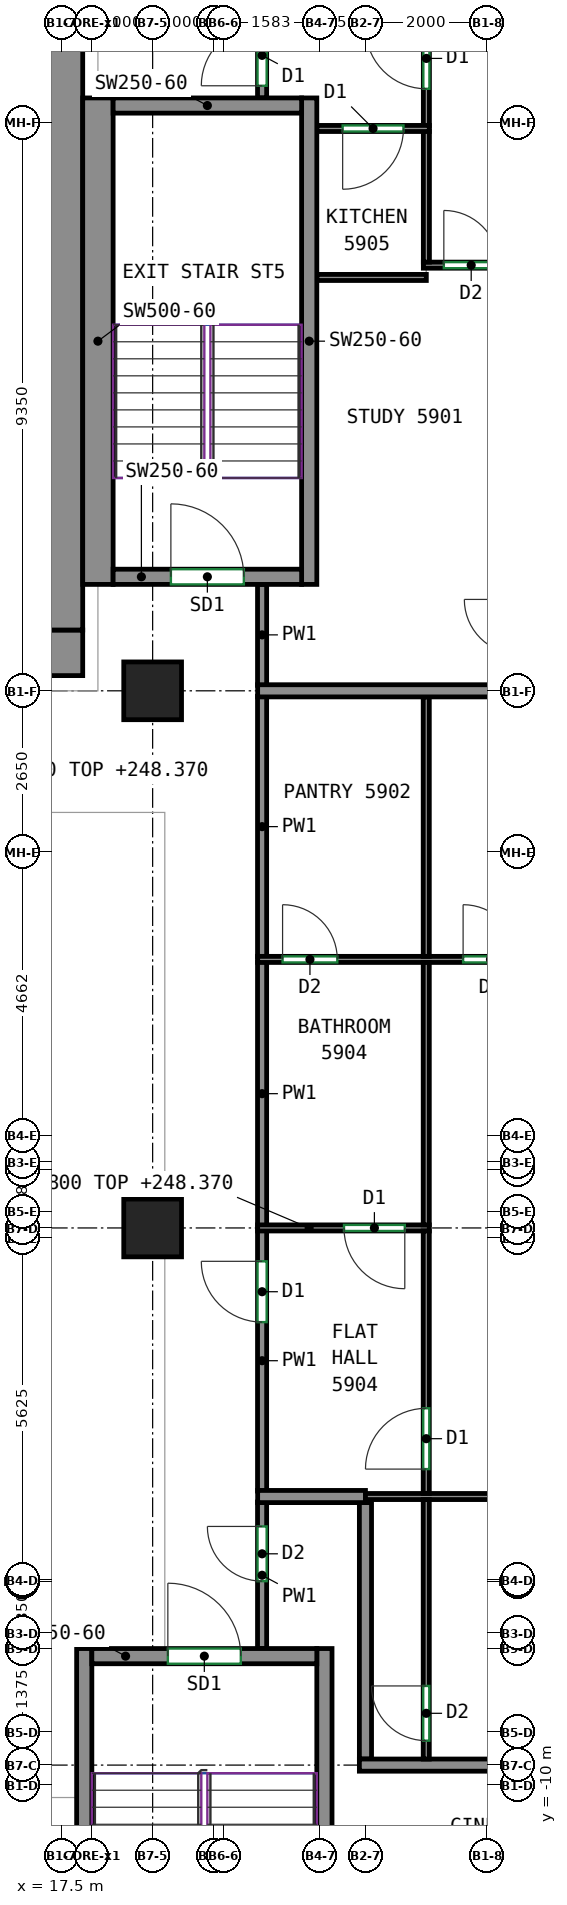
"""IFC4 building model, lengths in metres.
Left out: names, types, materials, properties, quantities, classifications, styles, units other than length and angle.
Written with IfcOpenShell. Run it as: python <this file> out.ifc"""

import sys

from ifc_helpers import new_model, si_unit, direction, frame, frame_2d, origin, origin_2d, place, context, subcontext, project, spatial, rectangle, extrude, source, transform, mapped, element, fill, save


model = new_model("IFC4")
c1 = context("Model", 3, precision=1e-05, world=origin(), true_north=direction((0.0, 1.0)))
c2 = subcontext(c1, "Body", "Model", "MODEL_VIEW")
j1 = project(units=[si_unit("LENGTHUNIT", "METRE"), si_unit("PLANEANGLEUNIT", "RADIAN")], contexts=[c1])
p1 = place(None, origin())
s1 = spatial("IfcSite", under=j1, at=p1, CompositionType="ELEMENT")
p2 = place(p1, origin())
s2 = spatial("IfcBuilding", under=s1, at=p2, CompositionType="ELEMENT")
p3 = place(p2, frame((0.0, 0.0, 245.8)))
s3 = spatial("IfcBuildingStorey", under=s2, at=p3, CompositionType="ELEMENT", Elevation=245.8)
m1 = source(origin(), c2, "Body", "SweptSolid", [
    extrude(rectangle(XDim=0.95, YDim=0.95, at=origin_2d()), origin(), (0.0, 0.0, 1.0), 3.12),
])
for number, where, z_axis, x_axis in (
    (1, (19.0, -0.833, 0.0), (0.0, 0.0, 1.0), (1.0, 0.0, 0.0)),
    (2, (19.0, 8.0, 0.0), (0.0, 0.0, 1.0), (1.0, 0.0, 0.0)),
):
    element("IfcColumn", number, at=place(p3, frame(where, z_axis=z_axis, x_axis=x_axis)), inside=s3, PredefinedType="COLUMN", context=c2, shape_type="MappedRepresentation", body=[
        mapped(m1, transform((0.0, 0.0, 0.0))),
    ])
m2 = source(origin(), c2, "Body", "SweptSolid", [
    extrude(rectangle(XDim=5.38, YDim=0.75, at=frame_2d((2.69, 0.0))), origin(), (0.0, 0.0, 1.0), 3.12),
])
p4 = place(p3, frame((12.47, 8.625, 0.0), z_axis=(0.0, 0.0, 1.0), x_axis=(1.0, 0.0, 0.0)))
e3 = element("IfcWall", 3, at=p4, inside=s3, PredefinedType="SHEAR", context=c2, shape_type="MappedRepresentation", body=[
    mapped(m2, transform((0.0, 0.0, 0.0))),
])
p5 = place(p4, frame((2.18, 0.0, 0.0)))
e4 = element("IfcOpeningElement", 4, at=p5, cuts=e3, PredefinedType="OPENING", context=c2, shape_type="SweptSolid", body=[
    extrude(rectangle(XDim=1.2, YDim=2.1, at=frame_2d((0.6, 1.05))), frame((0.0, 0.385, 0.0), z_axis=(0.0, -1.0, 0.0), x_axis=(1.0, 0.0, 0.0)), (0.0, 0.0, 1.0), 0.77),
])
m3 = source(origin(), c2, "Body", "SweptSolid", [
    extrude(rectangle(XDim=12.0, YDim=0.75, at=frame_2d((6.0, 0.0))), origin(), (0.0, 0.0, 1.0), 3.12),
])
p6 = place(p3, frame((17.475, 9.0, 0.0), z_axis=(0.0, 0.0, 1.0), x_axis=(0.0, 1.0, 0.0)))
e5 = element("IfcWall", 5, at=p6, inside=s3, PredefinedType="SHEAR", context=c2, shape_type="MappedRepresentation", body=[
    mapped(m3, transform((0.0, 0.0, 0.0))),
])
m4 = source(origin(), c2, "Body", "SweptSolid", [
    extrude(rectangle(XDim=8.0, YDim=0.25, at=frame_2d((4.0, 0.0))), origin(), (0.0, 0.0, 1.0), 3.12),
])
for number, where, z_axis, x_axis in (
    (6, (17.875, -15.75, 0.0), (0.0, 0.0, 1.0), (0.0, 1.0, 0.0)),
    (7, (21.825, -15.75, 0.0), (0.0, 0.0, 1.0), (0.0, 1.0, 0.0)),
):
    element("IfcWall", number, at=place(p3, frame(where, z_axis=z_axis, x_axis=x_axis)), inside=s3, PredefinedType="SHEAR", context=c2, shape_type="MappedRepresentation", body=[
        mapped(m4, transform((0.0, 0.0, 0.0))),
    ])
m5 = source(origin(), c2, "Body", "SweptSolid", [
    extrude(rectangle(XDim=3.7, YDim=0.25, at=frame_2d((1.85, 0.0))), origin(), (0.0, 0.0, 1.0), 3.12),
])
p7 = place(p3, frame((18.0, -7.875, 0.0), z_axis=(0.0, 0.0, 1.0), x_axis=(1.0, 0.0, 0.0)))
e8 = element("IfcWall", 8, at=p7, inside=s3, PredefinedType="SHEAR", context=c2, shape_type="MappedRepresentation", body=[
    mapped(m5, transform((0.0, 0.0, 0.0))),
])
p8 = place(p7, frame((1.25, 0.0, 0.0)))
e9 = element("IfcOpeningElement", 9, at=p8, cuts=e8, PredefinedType="OPENING", context=c2, shape_type="SweptSolid", body=[
    extrude(rectangle(XDim=1.2, YDim=2.1, at=frame_2d((0.6, 1.05))), frame((0.0, 0.135, 0.0), z_axis=(0.0, -1.0, 0.0), x_axis=(1.0, 0.0, 0.0)), (0.0, 0.0, 1.0), 0.27),
])
m6 = source(origin(), c2, "Body", "SweptSolid", [
    extrude(rectangle(XDim=8.0, YDim=0.5, at=frame_2d((4.0, 0.0))), origin(), (0.0, 0.0, 1.0), 3.12),
])
p9 = place(p3, frame((18.1, 9.75, 0.0), z_axis=(0.0, 0.0, 1.0), x_axis=(0.0, 1.0, 0.0)))
e10 = element("IfcWall", 10, at=p9, inside=s3, PredefinedType="SHEAR", context=c2, shape_type="MappedRepresentation", body=[
    mapped(m6, transform((0.0, 0.0, 0.0))),
])
p10 = place(p3, frame((21.575, 9.75, 0.0), z_axis=(0.0, 0.0, 1.0), x_axis=(0.0, 1.0, 0.0)))
e11 = element("IfcWall", 11, at=p10, inside=s3, PredefinedType="SHEAR", context=c2, shape_type="MappedRepresentation", body=[
    mapped(m4, transform((0.0, 0.0, 0.0))),
])
m7 = source(origin(), c2, "Body", "SweptSolid", [
    extrude(rectangle(XDim=3.1, YDim=0.25, at=frame_2d((1.55, 0.0))), origin(), (0.0, 0.0, 1.0), 3.12),
])
p11 = place(p3, frame((18.35, 9.875, 0.0), z_axis=(0.0, 0.0, 1.0), x_axis=(1.0, 0.0, 0.0)))
e12 = element("IfcWall", 12, at=p11, inside=s3, PredefinedType="SHEAR", context=c2, shape_type="MappedRepresentation", body=[
    mapped(m7, transform((0.0, 0.0, 0.0))),
])
p12 = place(p11, frame((0.95, 0.0, 0.0)))
e13 = element("IfcOpeningElement", 13, at=p12, cuts=e12, PredefinedType="OPENING", context=c2, shape_type="SweptSolid", body=[
    extrude(rectangle(XDim=1.2, YDim=2.1, at=frame_2d((0.6, 1.05))), frame((0.0, 0.135, 0.0), z_axis=(0.0, -1.0, 0.0), x_axis=(1.0, 0.0, 0.0)), (0.0, 0.0, 1.0), 0.27),
])
p13 = place(p3, frame((18.35, 17.625, 0.0), z_axis=(0.0, 0.0, 1.0), x_axis=(1.0, 0.0, 0.0)))
e14 = element("IfcWall", 14, at=p13, inside=s3, PredefinedType="SHEAR", context=c2, shape_type="MappedRepresentation", body=[
    mapped(m7, transform((0.0, 0.0, 0.0))),
])
p14 = place(p3, frame((20.8, -7.75, 0.0), z_axis=(0.0, 0.0, 1.0), x_axis=(0.0, 1.0, 0.0)))
e15 = element("IfcWall", 15, at=p14, inside=s3, PredefinedType="PARTITIONING", context=c2, shape_type="SweptSolid", body=[
    extrude(rectangle(XDim=2.41, YDim=0.15, at=frame_2d((1.205, 0.0))), origin(), (0.0, 0.0, 1.0), 3.12),
])
p15 = place(p14, frame((1.108, 0.0, 0.0)))
e16 = element("IfcOpeningElement", 16, at=p15, cuts=e15, PredefinedType="OPENING", context=c2, shape_type="SweptSolid", body=[
    extrude(rectangle(XDim=0.9, YDim=2.1, at=frame_2d((0.45, 1.05))), frame((0.0, 0.085, 0.0), z_axis=(0.0, -1.0, 0.0), x_axis=(1.0, 0.0, 0.0)), (0.0, 0.0, 1.0), 0.17),
])
p16 = place(p3, frame((20.8, -5.16, 0.0), z_axis=(0.0, 0.0, 1.0), x_axis=(0.0, 1.0, 0.0)))
e17 = element("IfcWall", 17, at=p16, inside=s3, PredefinedType="PARTITIONING", context=c2, shape_type="SweptSolid", body=[
    extrude(rectangle(XDim=4.287, YDim=0.15, at=frame_2d((2.144, 0.0))), origin(), (0.0, 0.0, 1.0), 3.12),
])
p17 = place(p16, frame((2.778, 0.0, 0.0)))
e18 = element("IfcOpeningElement", 18, at=p17, cuts=e17, PredefinedType="OPENING", context=c2, shape_type="SweptSolid", body=[
    extrude(rectangle(XDim=1.0, YDim=2.1, at=frame_2d((0.5, 1.05))), frame((0.0, 0.085, 0.0), z_axis=(0.0, -1.0, 0.0), x_axis=(1.0, 0.0, 0.0)), (0.0, 0.0, 1.0), 0.17),
])
p18 = place(p3, frame((20.8, -0.793, 0.0), z_axis=(0.0, 0.0, 1.0), x_axis=(0.0, 1.0, 0.0)))
e19 = element("IfcWall", 19, at=p18, inside=s3, PredefinedType="PARTITIONING", context=c2, shape_type="SweptSolid", body=[
    extrude(rectangle(XDim=4.336, YDim=0.15, at=frame_2d((2.168, 0.0))), origin(), (0.0, 0.0, 1.0), 3.12),
])
p19 = place(p3, frame((20.8, 3.623, 0.0), z_axis=(0.0, 0.0, 1.0), x_axis=(0.0, 1.0, 0.0)))
e20 = element("IfcWall", 20, at=p19, inside=s3, PredefinedType="PARTITIONING", context=c2, shape_type="SweptSolid", body=[
    extrude(rectangle(XDim=4.287, YDim=0.15, at=frame_2d((2.144, 0.0))), origin(), (0.0, 0.0, 1.0), 3.12),
])
p20 = place(p3, frame((20.8, 8.09, 0.0), z_axis=(0.0, 0.0, 1.0), x_axis=(0.0, 1.0, 0.0)))
e21 = element("IfcWall", 21, at=p20, inside=s3, PredefinedType="PARTITIONING", context=c2, shape_type="SweptSolid", body=[
    extrude(rectangle(XDim=1.66, YDim=0.15, at=frame_2d((0.83, 0.0))), origin(), (0.0, 0.0, 1.0), 3.12),
])
p21 = place(p3, frame((20.8, 17.75, 0.0), z_axis=(0.0, 0.0, 1.0), x_axis=(0.0, 1.0, 0.0)))
e22 = element("IfcWall", 22, at=p21, inside=s3, PredefinedType="PARTITIONING", context=c2, shape_type="SweptSolid", body=[
    extrude(rectangle(XDim=1.762, YDim=0.15, at=frame_2d((0.881, 0.0))), origin(), (0.0, 0.0, 1.0), 3.12),
])
p22 = place(p21, frame((0.2, 0.0, 0.0)))
e23 = element("IfcOpeningElement", 23, at=p22, cuts=e22, PredefinedType="OPENING", context=c2, shape_type="SweptSolid", body=[
    extrude(rectangle(XDim=1.0, YDim=2.1, at=frame_2d((0.5, 1.05))), frame((0.0, 0.085, 0.0), z_axis=(0.0, -1.0, 0.0), x_axis=(1.0, 0.0, 0.0)), (0.0, 0.0, 1.0), 0.17),
])
p23 = place(p3, frame((22.5, -9.567, 0.0), z_axis=(0.0, 0.0, 1.0), x_axis=(0.0, 1.0, 0.0)))
e24 = element("IfcWall", 24, at=p23, inside=s3, PredefinedType="PARTITIONING", context=c2, shape_type="SweptSolid", body=[
    extrude(rectangle(XDim=4.217, YDim=0.2, at=frame_2d((2.108, 0.0))), origin(), (0.0, 0.0, 1.0), 3.12),
])
p24 = place(p3, frame((22.4, -9.667, 0.0), z_axis=(0.0, 0.0, 1.0), x_axis=(1.0, 0.0, 0.0)))
e25 = element("IfcWall", 25, at=p24, inside=s3, PredefinedType="PARTITIONING", context=c2, shape_type="SweptSolid", body=[
    extrude(rectangle(XDim=6.3, YDim=0.2, at=frame_2d((3.15, 0.0))), origin(), (0.0, 0.0, 1.0), 3.12),
])
p25 = place(p3, frame((20.727, -5.25, 0.0), z_axis=(0.0, 0.0, 1.0), x_axis=(1.0, 0.0, 0.0)))
e26 = element("IfcWall", 26, at=p25, inside=s3, PredefinedType="PARTITIONING", context=c2, shape_type="SweptSolid", body=[
    extrude(rectangle(XDim=1.773, YDim=0.2, at=frame_2d((0.886, 0.0))), origin(), (0.0, 0.0, 1.0), 3.12),
])
p26 = place(p3, frame((22.5, -5.25, 0.0), z_axis=(0.0, 0.0, 1.0), x_axis=(1.0, 0.0, 0.0)))
e27 = element("IfcWall", 27, at=p26, inside=s3, PredefinedType="PARTITIONING", context=c2, shape_type="SweptSolid", body=[
    extrude(rectangle(XDim=6.75, YDim=0.1, at=frame_2d((3.375, 0.0))), origin(), (0.0, 0.0, 1.0), 3.12),
])
p27 = place(p26, frame((2.819, 0.0, 0.0)))
e28 = element("IfcOpeningElement", 28, at=p27, cuts=e27, PredefinedType="OPENING", context=c2, shape_type="SweptSolid", body=[
    extrude(rectangle(XDim=0.9, YDim=2.1, at=frame_2d((0.45, 1.05))), frame((0.0, 0.06, 0.0), z_axis=(0.0, -1.0, 0.0), x_axis=(1.0, 0.0, 0.0)), (0.0, 0.0, 1.0), 0.12),
])
p28 = place(p3, frame((23.5, -9.567, 0.0), z_axis=(0.0, 0.0, 1.0), x_axis=(0.0, 1.0, 0.0)))
e29 = element("IfcWall", 29, at=p28, inside=s3, PredefinedType="PARTITIONING", context=c2, shape_type="SweptSolid", body=[
    extrude(rectangle(XDim=4.267, YDim=0.1, at=frame_2d((2.133, 0.0))), origin(), (0.0, 0.0, 1.0), 3.12),
])
p29 = place(p28, frame((0.302, 0.0, 0.0)))
e30 = element("IfcOpeningElement", 30, at=p29, cuts=e29, PredefinedType="OPENING", context=c2, shape_type="SweptSolid", body=[
    extrude(rectangle(XDim=0.9, YDim=2.1, at=frame_2d((0.45, 1.05))), frame((0.0, 0.06, 0.0), z_axis=(0.0, -1.0, 0.0), x_axis=(1.0, 0.0, 0.0)), (0.0, 0.0, 1.0), 0.12),
])
p30 = place(p3, frame((23.55, -0.833, 0.0), z_axis=(0.0, 0.0, 1.0), x_axis=(-1.0, 0.0, 0.0)))
e31 = element("IfcWall", 31, at=p30, inside=s3, PredefinedType="PARTITIONING", context=c2, shape_type="SweptSolid", body=[
    extrude(rectangle(XDim=2.823, YDim=0.1, at=frame_2d((1.412, 0.0))), origin(), (0.0, 0.0, 1.0), 2.57),
])
p31 = place(p30, frame((0.403, 0.0, 0.0)))
e32 = element("IfcOpeningElement", 32, at=p31, cuts=e31, PredefinedType="OPENING", context=c2, shape_type="SweptSolid", body=[
    extrude(rectangle(XDim=1.0, YDim=2.1, at=frame_2d((0.5, 1.05))), frame((0.0, 0.06, 0.0), z_axis=(0.0, -1.0, 0.0), x_axis=(1.0, 0.0, 0.0)), (0.0, 0.0, 1.0), 0.12),
])
p32 = place(p3, frame((23.5, -5.2, 0.0), z_axis=(0.0, 0.0, 1.0), x_axis=(0.0, 1.0, 0.0)))
e33 = element("IfcWall", 33, at=p32, inside=s3, PredefinedType="PARTITIONING", context=c2, shape_type="SweptSolid", body=[
    extrude(rectangle(XDim=4.317, YDim=0.1, at=frame_2d((2.158, 0.0))), origin(), (0.0, 0.0, 1.0), 3.12),
])
p33 = place(p32, frame((0.401, 0.0, 0.0)))
e34 = element("IfcOpeningElement", 34, at=p33, cuts=e33, PredefinedType="OPENING", context=c2, shape_type="SweptSolid", body=[
    extrude(rectangle(XDim=1.0, YDim=2.1, at=frame_2d((0.5, 1.05))), frame((0.0, 0.06, 0.0), z_axis=(0.0, -1.0, 0.0), x_axis=(1.0, 0.0, 0.0)), (0.0, 0.0, 1.0), 0.12),
])
p34 = place(p3, frame((20.727, 3.583, 0.0), z_axis=(0.0, 0.0, 1.0), x_axis=(1.0, 0.0, 0.0)))
e35 = element("IfcWall", 35, at=p34, inside=s3, PredefinedType="PARTITIONING", context=c2, shape_type="SweptSolid", body=[
    extrude(rectangle(XDim=8.523, YDim=0.1, at=frame_2d((4.261, 0.0))), origin(), (0.0, 0.0, 1.0), 3.12),
])
p35 = place(p34, frame((0.41, 0.0, 0.0)))
e36 = element("IfcOpeningElement", 36, at=p35, cuts=e35, PredefinedType="OPENING", context=c2, shape_type="SweptSolid", body=[
    extrude(rectangle(XDim=0.9, YDim=2.1, at=frame_2d((0.45, 1.05))), frame((0.0, 0.06, 0.0), z_axis=(0.0, -1.0, 0.0), x_axis=(1.0, 0.0, 0.0)), (0.0, 0.0, 1.0), 0.12),
])
p36 = place(p34, frame((3.379, 0.0, 0.0)))
e37 = element("IfcOpeningElement", 37, at=p36, cuts=e35, PredefinedType="OPENING", context=c2, shape_type="SweptSolid", body=[
    extrude(rectangle(XDim=0.9, YDim=2.1, at=frame_2d((0.45, 1.05))), frame((0.0, 0.06, 0.0), z_axis=(0.0, -1.0, 0.0), x_axis=(1.0, 0.0, 0.0)), (0.0, 0.0, 1.0), 0.12),
])
p37 = place(p3, frame((23.5, -0.783, 0.0), z_axis=(0.0, 0.0, 1.0), x_axis=(0.0, 1.0, 0.0)))
e38 = element("IfcWall", 38, at=p37, inside=s3, PredefinedType="PARTITIONING", context=c2, shape_type="SweptSolid", body=[
    extrude(rectangle(XDim=4.316, YDim=0.1, at=frame_2d((2.158, 0.0))), origin(), (0.0, 0.0, 1.0), 3.12),
])
p38 = place(p3, frame((23.5, 3.633, 0.0), z_axis=(0.0, 0.0, 1.0), x_axis=(0.0, 1.0, 0.0)))
e39 = element("IfcWall", 39, at=p38, inside=s3, PredefinedType="PARTITIONING", context=c2, shape_type="SweptSolid", body=[
    extrude(rectangle(XDim=4.267, YDim=0.1, at=frame_2d((2.133, 0.0))), origin(), (0.0, 0.0, 1.0), 3.12),
])
p39 = place(p3, frame((20.727, 8.0, 0.0), z_axis=(0.0, 0.0, 1.0), x_axis=(1.0, 0.0, 0.0)))
e40 = element("IfcWall", 40, at=p39, inside=s3, PredefinedType="PARTITIONING", context=c2, shape_type="SweptSolid", body=[
    extrude(rectangle(XDim=7.973, YDim=0.2, at=frame_2d((3.986, 0.0))), origin(), (0.0, 0.0, 1.0), 2.57),
])
p40 = place(p3, frame((23.452, 15.0, 0.0), z_axis=(0.0, 0.0, 1.0), x_axis=(1.0, 0.0, 0.0)))
e41 = element("IfcWall", 41, at=p40, inside=s3, PredefinedType="PARTITIONING", context=c2, shape_type="SweptSolid", body=[
    extrude(rectangle(XDim=5.798, YDim=0.1, at=frame_2d((2.899, 0.0))), origin(), (0.0, 0.0, 1.0), 3.12),
])
p41 = place(p40, frame((0.337, 0.0, 0.0)))
e42 = element("IfcOpeningElement", 42, at=p41, cuts=e41, PredefinedType="OPENING", context=c2, shape_type="SweptSolid", body=[
    extrude(rectangle(XDim=0.9, YDim=2.1, at=frame_2d((0.45, 1.05))), frame((0.0, 0.06, 0.0), z_axis=(0.0, -1.0, 0.0), x_axis=(1.0, 0.0, 0.0)), (0.0, 0.0, 1.0), 0.12),
])
p42 = place(p3, frame((23.501, 14.798, 0.0), z_axis=(0.0, 0.0, 1.0), x_axis=(-1.0, 0.0, 0.0)))
e43 = element("IfcWall", 43, at=p42, inside=s3, PredefinedType="PARTITIONING", context=c2, shape_type="SweptSolid", body=[
    extrude(rectangle(XDim=1.801, YDim=0.1, at=frame_2d((0.9, 0.0))), origin(), (0.0, 0.0, 1.0), 3.12),
])
p43 = place(p3, frame((23.502, 15.05, 0.0), z_axis=(0.0, 0.0, 1.0), x_axis=(0.0, 1.0, 0.0)))
e44 = element("IfcWall", 44, at=p43, inside=s3, PredefinedType="PARTITIONING", context=c2, shape_type="SweptSolid", body=[
    extrude(rectangle(XDim=2.158, YDim=0.1, at=frame_2d((1.079, 0.0))), origin(), (0.0, 0.0, 1.0), 3.12),
])
p44 = place(p3, frame((23.502, 17.288, 0.0), z_axis=(0.0, 0.0, 1.0), x_axis=(0.0, 1.0, 0.0)))
e45 = element("IfcWall", 45, at=p44, inside=s3, PredefinedType="PARTITIONING", context=c2, shape_type="SweptSolid", body=[
    extrude(rectangle(XDim=2.224, YDim=0.1, at=frame_2d((1.112, 0.0))), origin(), (0.0, 0.0, 1.0), 3.12),
])
p45 = place(p44, frame((0.612, 0.0, 0.0)))
e46 = element("IfcOpeningElement", 46, at=p45, cuts=e45, PredefinedType="OPENING", context=c2, shape_type="SweptSolid", body=[
    extrude(rectangle(XDim=1.0, YDim=2.1, at=frame_2d((0.5, 1.05))), frame((0.0, 0.06, 0.0), z_axis=(0.0, -1.0, 0.0), x_axis=(1.0, 0.0, 0.0)), (0.0, 0.0, 1.0), 0.12),
])
p46 = place(p3, frame((23.55, 17.248, 0.0), z_axis=(0.0, 0.0, 1.0), x_axis=(-1.0, 0.0, 0.0)))
e47 = element("IfcWall", 47, at=p46, inside=s3, PredefinedType="PARTITIONING", context=c2, shape_type="SweptSolid", body=[
    extrude(rectangle(XDim=1.85, YDim=0.1, at=frame_2d((0.925, 0.0))), origin(), (0.0, 0.0, 1.0), 3.12),
])
p47 = place(p46, frame((0.425, 0.0, 0.0)))
e48 = element("IfcOpeningElement", 48, at=p47, cuts=e47, PredefinedType="OPENING", context=c2, shape_type="SweptSolid", body=[
    extrude(rectangle(XDim=1.0, YDim=2.1, at=frame_2d((0.5, 1.05))), frame((0.0, 0.06, 0.0), z_axis=(0.0, -1.0, 0.0), x_axis=(1.0, 0.0, 0.0)), (0.0, 0.0, 1.0), 0.12),
])
p48 = place(p8, origin())
e49 = element("IfcDoor", 49, at=p48, inside=s3, OperationType="DOUBLE_DOOR_SINGLE_SWING", PredefinedType="DOOR", context=c2, shape_type="SweptSolid", body=[
    extrude(rectangle(XDim=1.2, YDim=2.1, at=frame_2d((0.6, 1.05))), frame((0.0, 0.025, 0.0), z_axis=(0.0, -1.0, 0.0), x_axis=(1.0, 0.0, 0.0)), (0.0, 0.0, 1.0), 0.05),
])
fill(e9, e49)
p49 = place(p12, origin())
e50 = element("IfcDoor", 50, at=p49, inside=s3, OperationType="DOUBLE_DOOR_SINGLE_SWING", PredefinedType="DOOR", context=c2, shape_type="SweptSolid", body=[
    extrude(rectangle(XDim=1.2, YDim=2.1, at=frame_2d((0.6, 1.05))), frame((0.0, 0.025, 0.0), z_axis=(0.0, -1.0, 0.0), x_axis=(1.0, 0.0, 0.0)), (0.0, 0.0, 1.0), 0.05),
])
fill(e13, e50)
p50 = place(p29, origin())
e51 = element("IfcDoor", 51, at=p50, inside=s3, OperationType="SINGLE_SWING_RIGHT", PredefinedType="DOOR", context=c2, shape_type="SweptSolid", body=[
    extrude(rectangle(XDim=0.9, YDim=2.1, at=frame_2d((0.45, 1.05))), frame((0.0, 0.025, 0.0), z_axis=(0.0, -1.0, 0.0), x_axis=(1.0, 0.0, 0.0)), (0.0, 0.0, 1.0), 0.05),
])
fill(e30, e51)
p51 = place(p15, origin())
e52 = element("IfcDoor", 52, at=p51, inside=s3, OperationType="SINGLE_SWING_RIGHT", PredefinedType="DOOR", context=c2, shape_type="SweptSolid", body=[
    extrude(rectangle(XDim=0.9, YDim=2.1, at=frame_2d((0.45, 1.05))), frame((0.0, 0.025, 0.0), z_axis=(0.0, -1.0, 0.0), x_axis=(1.0, 0.0, 0.0)), (0.0, 0.0, 1.0), 0.05),
])
fill(e16, e52)
p52 = place(p33, origin())
e53 = element("IfcDoor", 53, at=p52, inside=s3, OperationType="SINGLE_SWING_LEFT", PredefinedType="DOOR", context=c2, shape_type="SweptSolid", body=[
    extrude(rectangle(XDim=1.0, YDim=2.1, at=frame_2d((0.5, 1.05))), frame((0.0, 0.025, 0.0), z_axis=(0.0, -1.0, 0.0), x_axis=(1.0, 0.0, 0.0)), (0.0, 0.0, 1.0), 0.05),
])
fill(e34, e53)
p53 = place(p17, origin())
e54 = element("IfcDoor", 54, at=p53, inside=s3, OperationType="SINGLE_SWING_RIGHT", PredefinedType="DOOR", context=c2, shape_type="SweptSolid", body=[
    extrude(rectangle(XDim=1.0, YDim=2.1, at=frame_2d((0.5, 1.05))), frame((0.0, 0.025, 0.0), z_axis=(0.0, -1.0, 0.0), x_axis=(1.0, 0.0, 0.0)), (0.0, 0.0, 1.0), 0.05),
])
fill(e18, e54)
p54 = place(p31, origin())
e55 = element("IfcDoor", 55, at=p54, inside=s3, OperationType="SINGLE_SWING_LEFT", PredefinedType="DOOR", context=c2, shape_type="SweptSolid", body=[
    extrude(rectangle(XDim=1.0, YDim=2.1, at=frame_2d((0.5, 1.05))), frame((0.0, 0.025, 0.0), z_axis=(0.0, -1.0, 0.0), x_axis=(1.0, 0.0, 0.0)), (0.0, 0.0, 1.0), 0.05),
])
fill(e32, e55)
p55 = place(p35, origin())
e56 = element("IfcDoor", 56, at=p55, inside=s3, OperationType="SINGLE_SWING_LEFT", PredefinedType="DOOR", context=c2, shape_type="SweptSolid", body=[
    extrude(rectangle(XDim=0.9, YDim=2.1, at=frame_2d((0.45, 1.05))), frame((0.0, 0.025, 0.0), z_axis=(0.0, -1.0, 0.0), x_axis=(1.0, 0.0, 0.0)), (0.0, 0.0, 1.0), 0.05),
])
fill(e36, e56)
p56 = place(p36, origin())
e57 = element("IfcDoor", 57, at=p56, inside=s3, OperationType="SINGLE_SWING_LEFT", PredefinedType="DOOR", context=c2, shape_type="SweptSolid", body=[
    extrude(rectangle(XDim=0.9, YDim=2.1, at=frame_2d((0.45, 1.05))), frame((0.0, 0.025, 0.0), z_axis=(0.0, -1.0, 0.0), x_axis=(1.0, 0.0, 0.0)), (0.0, 0.0, 1.0), 0.05),
])
fill(e37, e57)
p57 = place(p41, origin())
e58 = element("IfcDoor", 58, at=p57, inside=s3, OperationType="SINGLE_SWING_LEFT", PredefinedType="DOOR", context=c2, shape_type="SweptSolid", body=[
    extrude(rectangle(XDim=0.9, YDim=2.1, at=frame_2d((0.45, 1.05))), frame((0.0, 0.025, 0.0), z_axis=(0.0, -1.0, 0.0), x_axis=(1.0, 0.0, 0.0)), (0.0, 0.0, 1.0), 0.05),
])
fill(e42, e58)
p58 = place(p47, origin())
e59 = element("IfcDoor", 59, at=p58, inside=s3, OperationType="SINGLE_SWING_RIGHT", PredefinedType="DOOR", context=c2, shape_type="SweptSolid", body=[
    extrude(rectangle(XDim=1.0, YDim=2.1, at=frame_2d((0.5, 1.05))), frame((0.0, 0.025, 0.0), z_axis=(0.0, -1.0, 0.0), x_axis=(1.0, 0.0, 0.0)), (0.0, 0.0, 1.0), 0.05),
])
fill(e48, e59)
p59 = place(p45, origin())
e60 = element("IfcDoor", 60, at=p59, inside=s3, OperationType="SINGLE_SWING_RIGHT", PredefinedType="DOOR", context=c2, shape_type="SweptSolid", body=[
    extrude(rectangle(XDim=1.0, YDim=2.1, at=frame_2d((0.5, 1.05))), frame((0.0, 0.025, 0.0), z_axis=(0.0, -1.0, 0.0), x_axis=(1.0, 0.0, 0.0)), (0.0, 0.0, 1.0), 0.05),
])
fill(e46, e60)
p60 = place(p22, origin())
e61 = element("IfcDoor", 61, at=p60, inside=s3, OperationType="SINGLE_SWING_LEFT", PredefinedType="DOOR", context=c2, shape_type="SweptSolid", body=[
    extrude(rectangle(XDim=1.0, YDim=2.1, at=frame_2d((0.5, 1.05))), frame((0.0, 0.025, 0.0), z_axis=(0.0, -1.0, 0.0), x_axis=(1.0, 0.0, 0.0)), (0.0, 0.0, 1.0), 0.05),
])
fill(e23, e61)
save(model, sys.argv[1])
